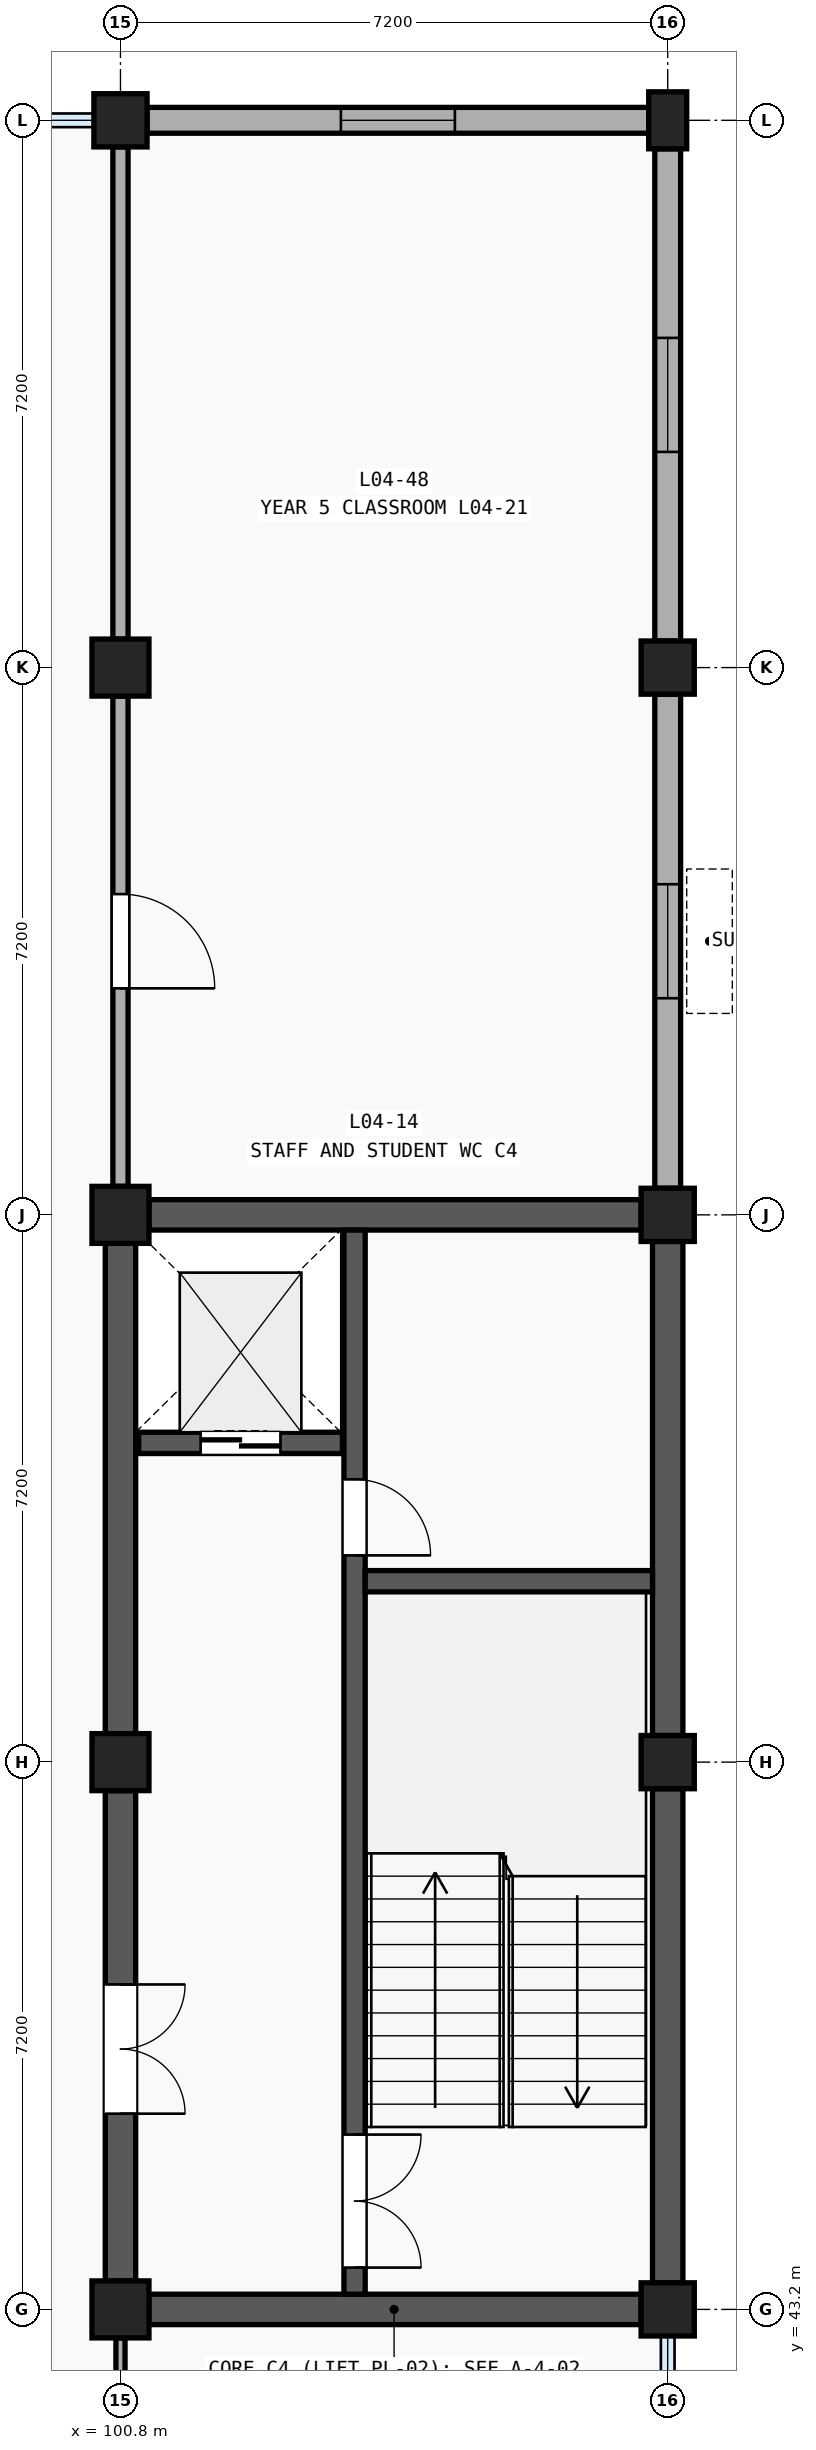
"""IFC4 building model, lengths in metres.
Left out: names, types, materials, properties, quantities, classifications, styles, units other than length and angle.
Written with IfcOpenShell. Run it as: python <this file> out.ifc"""

import sys

from ifc_helpers import new_model, si_unit, direction, frame, frame_2d, origin, origin_2d, place, context, subcontext, project, spatial, rectangle, extrude, element, fill, save


model = new_model("IFC4")
c1 = context("Model", 3, precision=1e-05, world=origin(), true_north=direction((0.0, 1.0)))
c2 = subcontext(c1, "Body", "Model", "MODEL_VIEW")
j1 = project(units=[si_unit("LENGTHUNIT", "METRE"), si_unit("PLANEANGLEUNIT", "RADIAN")], contexts=[c1])
p1 = place(None, origin())
s1 = spatial("IfcSite", under=j1, at=p1, CompositionType="ELEMENT")
p2 = place(p1, origin())
s2 = spatial("IfcBuilding", under=s1, at=p2, CompositionType="ELEMENT")
p3 = place(p2, frame((0.0, 0.0, 18.6)))
s3 = spatial("IfcBuildingStorey", under=s2, at=p3, CompositionType="ELEMENT", Elevation=18.6)
for number, where, z_axis, x_axis in (
    (1, (100.8, 43.2, 0.0), (0.0, 0.0, 1.0), (1.0, 0.0, 0.0)),
    (2, (100.8, 50.4, 0.0), (0.0, 0.0, 1.0), (1.0, 0.0, 0.0)),
    (3, (100.8, 57.6, 0.0), (0.0, 0.0, 1.0), (1.0, 0.0, 0.0)),
    (4, (100.8, 64.8, 0.0), (0.0, 0.0, 1.0), (1.0, 0.0, 0.0)),
):
    element("IfcColumn", number, at=place(p3, frame(where, z_axis=z_axis, x_axis=x_axis)), inside=s3, PredefinedType="COLUMN", context=c2, shape_type="SweptSolid", body=[
        extrude(rectangle(XDim=0.75, YDim=0.75, at=origin_2d()), origin(), (0.0, 0.0, 1.0), 4.0),
    ])
for number, where, z_axis, x_axis in (
    (5, (100.8, 72.0, 0.0), (0.0, 0.0, 1.0), (1.0, 0.0, 0.0)),
    (6, (108.0, 43.2, 0.0), (0.0, 0.0, 1.0), (1.0, 0.0, 0.0)),
    (7, (108.0, 50.4, 0.0), (0.0, 0.0, 1.0), (1.0, 0.0, 0.0)),
    (8, (108.0, 57.6, 0.0), (0.0, 0.0, 1.0), (1.0, 0.0, 0.0)),
    (9, (108.0, 64.8, 0.0), (0.0, 0.0, 1.0), (1.0, 0.0, 0.0)),
):
    element("IfcColumn", number, at=place(p3, frame(where, z_axis=z_axis, x_axis=x_axis)), inside=s3, PredefinedType="COLUMN", context=c2, shape_type="SweptSolid", body=[
        extrude(rectangle(XDim=0.7, YDim=0.7, at=origin_2d()), origin(), (0.0, 0.0, 1.0), 4.0),
    ])
p4 = place(p3, frame((108.0, 72.0, 0.0), z_axis=(0.0, 0.0, 1.0), x_axis=(1.0, 0.0, 0.0)))
e10 = element("IfcColumn", 10, at=p4, inside=s3, PredefinedType="PILASTER", context=c2, shape_type="SweptSolid", body=[
    extrude(rectangle(XDim=0.5, YDim=0.75, at=origin_2d()), origin(), (0.0, 0.0, 1.0), 4.0),
])
p5 = place(p3, frame((108.0, 57.95, 0.0), z_axis=(0.0, 0.0, 1.0), x_axis=(0.0, 1.0, 0.0)))
e11 = element("IfcWall", 11, at=p5, inside=s3, PredefinedType="SOLIDWALL", context=c2, shape_type="SweptSolid", body=[
    extrude(rectangle(XDim=6.5, YDim=0.34, at=frame_2d((3.25, 0.0))), origin(), (0.0, 0.0, 1.0), 3.11),
])
p6 = place(p5, frame((2.5, 0.0, 1.1)))
e12 = element("IfcOpeningElement", 12, at=p6, cuts=e11, PredefinedType="OPENING", context=c2, shape_type="SweptSolid", body=[
    extrude(rectangle(XDim=1.5, YDim=1.35, at=frame_2d((0.75, 0.675))), frame((0.0, 0.182, 0.0), z_axis=(0.0, -1.0, 0.0), x_axis=(1.0, 0.0, 0.0)), (0.0, 0.0, 1.0), 0.364),
])
p7 = place(p3, frame((101.15, 72.0, 0.0), z_axis=(0.0, 0.0, 1.0), x_axis=(1.0, 0.0, 0.0)))
e13 = element("IfcWall", 13, at=p7, inside=s3, PredefinedType="SOLIDWALL", context=c2, shape_type="SweptSolid", body=[
    extrude(rectangle(XDim=6.6, YDim=0.34, at=frame_2d((3.3, 0.0))), origin(), (0.0, 0.0, 1.0), 3.11),
])
p8 = place(p7, frame((2.55, 0.0, 1.1)))
e14 = element("IfcOpeningElement", 14, at=p8, cuts=e13, PredefinedType="OPENING", context=c2, shape_type="SweptSolid", body=[
    extrude(rectangle(XDim=1.5, YDim=1.35, at=frame_2d((0.75, 0.675))), frame((0.0, 0.182, 0.0), z_axis=(0.0, -1.0, 0.0), x_axis=(1.0, 0.0, 0.0)), (0.0, 0.0, 1.0), 0.364),
])
p9 = place(p3, frame((108.0, 65.15, 0.0), z_axis=(0.0, 0.0, 1.0), x_axis=(0.0, 1.0, 0.0)))
e15 = element("IfcWall", 15, at=p9, inside=s3, PredefinedType="SOLIDWALL", context=c2, shape_type="SweptSolid", body=[
    extrude(rectangle(XDim=6.475, YDim=0.34, at=frame_2d((3.238, 0.0))), origin(), (0.0, 0.0, 1.0), 3.11),
])
p10 = place(p9, frame((2.488, 0.0, 1.1)))
e16 = element("IfcOpeningElement", 16, at=p10, cuts=e15, PredefinedType="OPENING", context=c2, shape_type="SweptSolid", body=[
    extrude(rectangle(XDim=1.5, YDim=1.35, at=frame_2d((0.75, 0.675))), frame((0.0, 0.182, 0.0), z_axis=(0.0, -1.0, 0.0), x_axis=(1.0, 0.0, 0.0)), (0.0, 0.0, 1.0), 0.364),
])
p11 = place(p3, frame((100.8, 43.575, 0.0), z_axis=(0.0, 0.0, 1.0), x_axis=(0.0, 1.0, 0.0)))
e17 = element("IfcWall", 17, at=p11, inside=s3, PredefinedType="SHEAR", context=c2, shape_type="SweptSolid", body=[
    extrude(rectangle(XDim=6.45, YDim=0.4, at=frame_2d((3.225, 0.0))), origin(), (0.0, 0.0, 1.0), 2.97),
])
p12 = place(p11, frame((2.2, 0.0, 0.0)))
e18 = element("IfcOpeningElement", 18, at=p12, cuts=e17, PredefinedType="OPENING", context=c2, shape_type="SweptSolid", body=[
    extrude(rectangle(XDim=1.7, YDim=2.25, at=frame_2d((0.85, 1.125))), frame((0.0, 0.212, 0.0), z_axis=(0.0, -1.0, 0.0), x_axis=(1.0, 0.0, 0.0)), (0.0, 0.0, 1.0), 0.424),
])
p13 = place(p3, frame((100.8, 50.775, 0.0), z_axis=(0.0, 0.0, 1.0), x_axis=(0.0, 1.0, 0.0)))
e19 = element("IfcWall", 19, at=p13, inside=s3, PredefinedType="SHEAR", context=c2, shape_type="SweptSolid", body=[
    extrude(rectangle(XDim=6.45, YDim=0.4, at=frame_2d((3.225, 0.0))), origin(), (0.0, 0.0, 1.0), 2.97),
])
for number, where, z_axis, x_axis in (
    (20, (108.0, 43.55, 0.0), (0.0, 0.0, 1.0), (0.0, 1.0, 0.0)),
    (21, (108.0, 50.75, 0.0), (0.0, 0.0, 1.0), (0.0, 1.0, 0.0)),
):
    element("IfcWall", number, at=place(p3, frame(where, z_axis=z_axis, x_axis=x_axis)), inside=s3, PredefinedType="SHEAR", context=c2, shape_type="SweptSolid", body=[
        extrude(rectangle(XDim=6.5, YDim=0.4, at=frame_2d((3.25, 0.0))), origin(), (0.0, 0.0, 1.0), 3.11),
    ])
p14 = place(p3, frame((101.175, 43.2, 0.0), z_axis=(0.0, 0.0, 1.0), x_axis=(1.0, 0.0, 0.0)))
e22 = element("IfcWall", 22, at=p14, inside=s3, PredefinedType="SHEAR", context=c2, shape_type="SweptSolid", body=[
    extrude(rectangle(XDim=6.475, YDim=0.4, at=frame_2d((3.237, 0.0))), origin(), (0.0, 0.0, 1.0), 3.04),
])
p15 = place(p3, frame((101.175, 57.6, 0.0), z_axis=(0.0, 0.0, 1.0), x_axis=(1.0, 0.0, 0.0)))
e23 = element("IfcWall", 23, at=p15, inside=s3, PredefinedType="SHEAR", context=c2, shape_type="SweptSolid", body=[
    extrude(rectangle(XDim=6.475, YDim=0.4, at=frame_2d((3.237, 0.0))), origin(), (0.0, 0.0, 1.0), 2.97),
])
p16 = place(p3, frame((103.88, 43.4, 0.0), z_axis=(0.0, 0.0, 1.0), x_axis=(0.0, 1.0, 0.0)))
e24 = element("IfcWall", 24, at=p16, inside=s3, PredefinedType="SHEAR", context=c2, shape_type="SweptSolid", body=[
    extrude(rectangle(XDim=14.0, YDim=0.28, at=frame_2d((7.0, 0.0))), origin(), (0.0, 0.0, 1.0), 3.74),
])
p17 = place(p16, frame((0.35, 0.0, 0.0)))
e25 = element("IfcOpeningElement", 25, at=p17, cuts=e24, PredefinedType="OPENING", context=c2, shape_type="SweptSolid", body=[
    extrude(rectangle(XDim=1.75, YDim=2.15, at=frame_2d((0.875, 1.075))), frame((0.0, 0.152, 0.0), z_axis=(0.0, -1.0, 0.0), x_axis=(1.0, 0.0, 0.0)), (0.0, 0.0, 1.0), 0.304),
])
p18 = place(p16, frame((9.72, 0.0, 0.0)))
e26 = element("IfcOpeningElement", 26, at=p18, cuts=e24, PredefinedType="OPENING", context=c2, shape_type="SweptSolid", body=[
    extrude(rectangle(XDim=1.0, YDim=2.15, at=frame_2d((0.5, 1.075))), frame((0.0, 0.152, 0.0), z_axis=(0.0, -1.0, 0.0), x_axis=(1.0, 0.0, 0.0)), (0.0, 0.0, 1.0), 0.304),
])
p19 = place(p3, frame((104.02, 52.78, 0.0), z_axis=(0.0, 0.0, 1.0), x_axis=(1.0, 0.0, 0.0)))
e27 = element("IfcWall", 27, at=p19, inside=s3, PredefinedType="SHEAR", context=c2, shape_type="SweptSolid", body=[
    extrude(rectangle(XDim=3.78, YDim=0.28, at=frame_2d((1.89, 0.0))), origin(), (0.0, 0.0, 1.0), 3.74),
])
p20 = place(p3, frame((101.04, 54.6, 0.0), z_axis=(0.0, 0.0, 1.0), x_axis=(1.0, 0.0, 0.0)))
e28 = element("IfcWall", 28, at=p20, inside=s3, PredefinedType="SHEAR", context=c2, shape_type="SweptSolid", body=[
    extrude(rectangle(XDim=2.68, YDim=0.28, at=frame_2d((1.34, 0.0))), origin(), (0.0, 0.0, 1.0), 3.74),
])
p21 = place(p20, frame((0.815, 0.0, 0.0)))
e29 = element("IfcOpeningElement", 29, at=p21, cuts=e28, PredefinedType="OPENING", context=c2, shape_type="SweptSolid", body=[
    extrude(rectangle(XDim=1.05, YDim=2.2, at=frame_2d((0.525, 1.1))), frame((0.0, 0.152, 0.0), z_axis=(0.0, -1.0, 0.0), x_axis=(1.0, 0.0, 0.0)), (0.0, 0.0, 1.0), 0.304),
])
p22 = place(p3, frame((100.8, 36.375, 0.0), z_axis=(0.0, 0.0, 1.0), x_axis=(0.0, 1.0, 0.0)))
e30 = element("IfcWall", 30, at=p22, inside=s3, PredefinedType="MOVABLE", context=c2, shape_type="SweptSolid", body=[
    extrude(rectangle(XDim=6.45, YDim=0.12, at=frame_2d((3.225, 0.0))), origin(), (0.0, 0.0, 1.0), 2.97),
])
p23 = place(p3, frame((100.8, 57.975, 0.0), z_axis=(0.0, 0.0, 1.0), x_axis=(0.0, 1.0, 0.0)))
e31 = element("IfcWall", 31, at=p23, inside=s3, PredefinedType="PARTITIONING", context=c2, shape_type="SweptSolid", body=[
    extrude(rectangle(XDim=6.45, YDim=0.2, at=frame_2d((3.225, 0.0))), origin(), (0.0, 0.0, 1.0), 2.97),
])
p24 = place(p23, frame((2.605, 0.0, 0.0)))
e32 = element("IfcOpeningElement", 32, at=p24, cuts=e31, PredefinedType="OPENING", context=c2, shape_type="SweptSolid", body=[
    extrude(rectangle(XDim=1.24, YDim=2.26, at=frame_2d((0.62, 1.13))), frame((0.0, 0.112, 0.0), z_axis=(0.0, -1.0, 0.0), x_axis=(1.0, 0.0, 0.0)), (0.0, 0.0, 1.0), 0.224),
])
p25 = place(p3, frame((100.8, 65.175, 0.0), z_axis=(0.0, 0.0, 1.0), x_axis=(0.0, 1.0, 0.0)))
e33 = element("IfcWall", 33, at=p25, inside=s3, PredefinedType="PARTITIONING", context=c2, shape_type="SweptSolid", body=[
    extrude(rectangle(XDim=6.475, YDim=0.2, at=frame_2d((3.237, 0.0))), origin(), (0.0, 0.0, 1.0), 2.97),
])
p26 = place(p6, origin())
e34 = element("IfcWindow", 34, at=p26, inside=s3, PartitioningType="SINGLE_PANEL", PredefinedType="WINDOW", context=c2, shape_type="SweptSolid", body=[
    extrude(rectangle(XDim=1.5, YDim=1.35, at=frame_2d((0.75, 0.675))), frame((0.0, 0.03, 0.0), z_axis=(0.0, -1.0, 0.0), x_axis=(1.0, 0.0, 0.0)), (0.0, 0.0, 1.0), 0.06),
])
fill(e12, e34)
p27 = place(p8, origin())
e35 = element("IfcWindow", 35, at=p27, inside=s3, PartitioningType="SINGLE_PANEL", PredefinedType="WINDOW", context=c2, shape_type="SweptSolid", body=[
    extrude(rectangle(XDim=1.5, YDim=1.35, at=frame_2d((0.75, 0.675))), frame((0.0, 0.03, 0.0), z_axis=(0.0, -1.0, 0.0), x_axis=(1.0, 0.0, 0.0)), (0.0, 0.0, 1.0), 0.06),
])
fill(e14, e35)
p28 = place(p10, origin())
e36 = element("IfcWindow", 36, at=p28, inside=s3, PartitioningType="SINGLE_PANEL", PredefinedType="WINDOW", context=c2, shape_type="SweptSolid", body=[
    extrude(rectangle(XDim=1.5, YDim=1.35, at=frame_2d((0.75, 0.675))), frame((0.0, 0.03, 0.0), z_axis=(0.0, -1.0, 0.0), x_axis=(1.0, 0.0, 0.0)), (0.0, 0.0, 1.0), 0.06),
])
fill(e16, e36)
p29 = place(p12, frame((1.7, 0.0, 0.0), z_axis=(0.0, 0.0, 1.0), x_axis=(-1.0, 0.0, 0.0)))
e37 = element("IfcDoor", 37, at=p29, inside=s3, OperationType="DOUBLE_DOOR_SINGLE_SWING", PredefinedType="DOOR", context=c2, shape_type="SweptSolid", body=[
    extrude(rectangle(XDim=1.7, YDim=2.25, at=frame_2d((0.85, 1.125))), frame((0.0, 0.025, 0.0), z_axis=(0.0, -1.0, 0.0), x_axis=(1.0, 0.0, 0.0)), (0.0, 0.0, 1.0), 0.05),
])
fill(e18, e37)
p30 = place(p17, frame((1.75, 0.0, 0.0), z_axis=(0.0, 0.0, 1.0), x_axis=(-1.0, 0.0, 0.0)))
e38 = element("IfcDoor", 38, at=p30, inside=s3, OperationType="DOUBLE_DOOR_SINGLE_SWING", PredefinedType="DOOR", context=c2, shape_type="SweptSolid", body=[
    extrude(rectangle(XDim=1.75, YDim=2.15, at=frame_2d((0.875, 1.075))), frame((0.0, 0.025, 0.0), z_axis=(0.0, -1.0, 0.0), x_axis=(1.0, 0.0, 0.0)), (0.0, 0.0, 1.0), 0.05),
])
fill(e25, e38)
p31 = place(p18, frame((1.0, 0.0, 0.0), z_axis=(0.0, 0.0, 1.0), x_axis=(-1.0, 0.0, 0.0)))
e39 = element("IfcDoor", 39, at=p31, inside=s3, OperationType="SINGLE_SWING_RIGHT", PredefinedType="DOOR", context=c2, shape_type="SweptSolid", body=[
    extrude(rectangle(XDim=1.0, YDim=2.15, at=frame_2d((0.5, 1.075))), frame((0.0, 0.025, 0.0), z_axis=(0.0, -1.0, 0.0), x_axis=(1.0, 0.0, 0.0)), (0.0, 0.0, 1.0), 0.05),
])
fill(e26, e39)
p32 = place(p21, frame((1.05, 0.0, 0.0), z_axis=(0.0, 0.0, 1.0), x_axis=(-1.0, 0.0, 0.0)))
e40 = element("IfcDoor", 40, at=p32, inside=s3, OperationType="DOUBLE_DOOR_SLIDING", PredefinedType="DOOR", context=c2, shape_type="SweptSolid", body=[
    extrude(rectangle(XDim=1.05, YDim=2.2, at=frame_2d((0.525, 1.1))), frame((0.0, 0.025, 0.0), z_axis=(0.0, -1.0, 0.0), x_axis=(1.0, 0.0, 0.0)), (0.0, 0.0, 1.0), 0.05),
])
fill(e29, e40)
p33 = place(p24, frame((1.24, 0.0, 0.0), z_axis=(0.0, 0.0, 1.0), x_axis=(-1.0, 0.0, 0.0)))
e41 = element("IfcDoor", 41, at=p33, inside=s3, OperationType="SINGLE_SWING_RIGHT", PredefinedType="DOOR", context=c2, shape_type="SweptSolid", body=[
    extrude(rectangle(XDim=1.24, YDim=2.26, at=frame_2d((0.62, 1.13))), frame((0.0, 0.025, 0.0), z_axis=(0.0, -1.0, 0.0), x_axis=(1.0, 0.0, 0.0)), (0.0, 0.0, 1.0), 0.05),
])
fill(e32, e41)
save(model, sys.argv[1])
